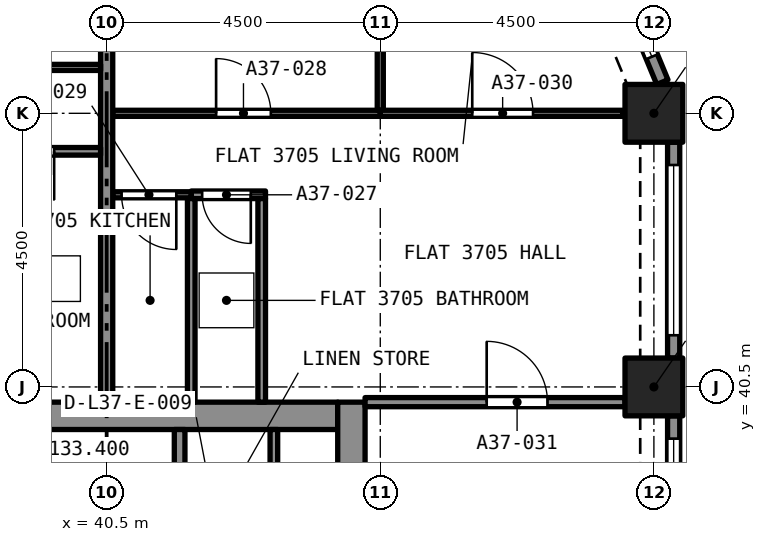
"""IFC4 building model, lengths in metres.
Left out: names, types, materials, properties, quantities, classifications, styles, units other than length and angle.
Written with IfcOpenShell. Run it as: python <this file> out.ifc"""

import sys

from ifc_helpers import new_model, si_unit, direction, frame, frame_2d, origin, origin_2d, place, context, subcontext, project, spatial, rectangle, extrude, element, fill, save


model = new_model("IFC4")
c1 = context("Model", 3, precision=1e-05, world=origin(), true_north=direction((0.0, 1.0)))
c2 = subcontext(c1, "Body", "Model", "MODEL_VIEW")
j1 = project(units=[si_unit("LENGTHUNIT", "METRE"), si_unit("PLANEANGLEUNIT", "RADIAN")], contexts=[c1])
p1 = place(None, origin())
s1 = spatial("IfcSite", under=j1, at=p1, CompositionType="ELEMENT")
p2 = place(p1, origin())
s2 = spatial("IfcBuilding", under=s1, at=p2, CompositionType="ELEMENT")
p3 = place(p2, frame((0.0, 0.0, 133.4)))
s3 = spatial("IfcBuildingStorey", under=s2, at=p3, CompositionType="ELEMENT", Elevation=133.4)
for number, where, z_axis, x_axis in (
    (1, (49.5, 40.5, 0.0), (0.0, 0.0, 1.0), (1.0, 0.0, 0.0)),
    (2, (49.5, 45.0, 0.0), (0.0, 0.0, 1.0), (1.0, 0.0, 0.0)),
):
    element("IfcColumn", number, at=place(p3, frame(where, z_axis=z_axis, x_axis=x_axis)), inside=s3, PredefinedType="COLUMN", context=c2, shape_type="SweptSolid", body=[
        extrude(rectangle(XDim=0.95, YDim=0.95, at=origin_2d()), origin(), (0.0, 0.0, 1.0), 3.2),
    ])
p4 = place(p3, frame((36.7, 40.025, 0.0), z_axis=(0.0, 0.0, 1.0), x_axis=(1.0, 0.0, 0.0)))
e3 = element("IfcWall", 3, at=p4, inside=s3, PredefinedType="SOLIDWALL", context=c2, shape_type="SweptSolid", body=[
    extrude(rectangle(XDim=7.6, YDim=0.45, at=frame_2d((3.8, 0.0))), origin(), (0.0, 0.0, 1.0), 3.2),
])
p5 = place(p3, frame((44.525, 27.25, 0.0), z_axis=(0.0, 0.0, 1.0), x_axis=(0.0, 1.0, 0.0)))
e4 = element("IfcWall", 4, at=p5, inside=s3, PredefinedType="SOLIDWALL", context=c2, shape_type="SweptSolid", body=[
    extrude(rectangle(XDim=13.0, YDim=0.45, at=frame_2d((6.5, 0.0))), origin(), (0.0, 0.0, 1.0), 3.2),
])
p6 = place(p5, frame((8.7, 0.0, 0.0)))
e5 = element("IfcOpeningElement", 5, at=p6, cuts=e4, PredefinedType="OPENING", context=c2, shape_type="SweptSolid", body=[
    extrude(rectangle(XDim=1.2, YDim=2.1, at=frame_2d((0.6, 1.05))), frame((0.0, 0.235, 0.0), z_axis=(0.0, -1.0, 0.0), x_axis=(1.0, 0.0, 0.0)), (0.0, 0.0, 1.0), 0.47),
])
p7 = place(p3, frame((49.825, 40.025, 0.0), z_axis=(0.0, 0.0, 1.0), x_axis=(0.0, -1.0, 0.0)))
e6 = element("IfcWall", 6, at=p7, inside=s3, PredefinedType="SOLIDWALL", context=c2, shape_type="SweptSolid", body=[
    extrude(rectangle(XDim=3.55, YDim=0.2, at=frame_2d((1.775, 0.0))), origin(), (0.0, 0.0, 1.0), 3.2),
])
p8 = place(p7, frame((0.375, 0.0, 0.45)))
e7 = element("IfcOpeningElement", 7, at=p8, cuts=e6, PredefinedType="OPENING", context=c2, shape_type="SweptSolid", body=[
    extrude(rectangle(XDim=2.8, YDim=1.95, at=frame_2d((1.4, 0.975))), frame((0.0, 0.11, 0.0), z_axis=(0.0, -1.0, 0.0), x_axis=(1.0, 0.0, 0.0)), (0.0, 0.0, 1.0), 0.22),
])
p9 = place(p3, frame((49.825, 44.525, 0.0), z_axis=(0.0, 0.0, 1.0), x_axis=(0.0, -1.0, 0.0)))
e8 = element("IfcWall", 8, at=p9, inside=s3, PredefinedType="SOLIDWALL", context=c2, shape_type="SweptSolid", body=[
    extrude(rectangle(XDim=3.55, YDim=0.2, at=frame_2d((1.775, 0.0))), origin(), (0.0, 0.0, 1.0), 3.2),
])
p10 = place(p9, frame((0.375, 0.0, 0.45)))
e9 = element("IfcOpeningElement", 9, at=p10, cuts=e8, PredefinedType="OPENING", context=c2, shape_type="SweptSolid", body=[
    extrude(rectangle(XDim=2.8, YDim=1.95, at=frame_2d((1.4, 0.975))), frame((0.0, 0.11, 0.0), z_axis=(0.0, -1.0, 0.0), x_axis=(1.0, 0.0, 0.0)), (0.0, 0.0, 1.0), 0.22),
])
p11 = place(p3, frame((48.72, 47.733, 0.0), z_axis=(0.0, 0.0, 1.0), x_axis=(0.382680855588, -0.923880599843, 0.0)))
e10 = element("IfcWall", 10, at=p11, inside=s3, PredefinedType="SOLIDWALL", context=c2, shape_type="SweptSolid", body=[
    extrude(rectangle(XDim=2.403, YDim=0.2, at=frame_2d((1.201, 0.0))), origin(), (0.0, 0.0, 1.0), 3.2),
])
p12 = place(p11, frame((0.251, 0.0, 0.45)))
e11 = element("IfcOpeningElement", 11, at=p12, cuts=e10, PredefinedType="OPENING", context=c2, shape_type="SweptSolid", body=[
    extrude(rectangle(XDim=1.7, YDim=1.95, at=frame_2d((0.85, 0.975))), frame((0.0, 0.11, 0.0), z_axis=(0.0, -1.0, 0.0), x_axis=(1.0, 0.0, 0.0)), (0.0, 0.0, 1.0), 0.22),
])
p13 = place(p3, frame((43.113, 43.66, 0.0), z_axis=(0.0, 0.0, 1.0), x_axis=(-1.0, 0.0, 0.0)))
e12 = element("IfcWall", 12, at=p13, inside=s3, PredefinedType="PARTITIONING", context=c2, shape_type="SweptSolid", body=[
    extrude(rectangle(XDim=1.222, YDim=0.125, at=frame_2d((0.611, 0.0))), origin(), (0.0, 0.0, 1.0), 2.9),
])
p14 = place(p13, frame((0.242, 0.0, 0.0)))
e13 = element("IfcOpeningElement", 13, at=p14, cuts=e12, PredefinedType="OPENING", context=c2, shape_type="SweptSolid", body=[
    extrude(rectangle(XDim=0.8, YDim=2.1, at=frame_2d((0.4, 1.05))), frame((0.0, 0.073, 0.0), z_axis=(0.0, -1.0, 0.0), x_axis=(1.0, 0.0, 0.0)), (0.0, 0.0, 1.0), 0.145),
])
for number, where, z_axis, x_axis in (
    (14, (43.05, 40.25, 0.0), (0.0, 0.0, 1.0), (0.0, 1.0, 0.0)),
    (15, (41.891, 40.25, 0.0), (0.0, 0.0, 1.0), (0.0, 1.0, 0.0)),
):
    element("IfcWall", number, at=place(p3, frame(where, z_axis=z_axis, x_axis=x_axis)), inside=s3, PredefinedType="PARTITIONING", context=c2, shape_type="SweptSolid", body=[
        extrude(rectangle(XDim=3.347, YDim=0.125, at=frame_2d((1.674, 0.0))), origin(), (0.0, 0.0, 1.0), 2.9),
    ])
p15 = place(p3, frame((40.6, 45.0, 0.0), z_axis=(0.0, 0.0, 1.0), x_axis=(1.0, 0.0, 0.0)))
e16 = element("IfcWall", 16, at=p15, inside=s3, PredefinedType="PARTITIONING", context=c2, shape_type="SweptSolid", body=[
    extrude(rectangle(XDim=4.4, YDim=0.1, at=frame_2d((2.2, 0.0))), origin(), (0.0, 0.0, 1.0), 2.9),
])
p16 = place(p15, frame((1.7, 0.0, 0.0)))
e17 = element("IfcOpeningElement", 17, at=p16, cuts=e16, PredefinedType="OPENING", context=c2, shape_type="SweptSolid", body=[
    extrude(rectangle(XDim=0.9, YDim=2.1, at=frame_2d((0.45, 1.05))), frame((0.0, 0.06, 0.0), z_axis=(0.0, -1.0, 0.0), x_axis=(1.0, 0.0, 0.0)), (0.0, 0.0, 1.0), 0.12),
])
p17 = place(p3, frame((45.0, 45.05, 0.0), z_axis=(0.0, 0.0, 1.0), x_axis=(0.0, 1.0, 0.0)))
e18 = element("IfcWall", 18, at=p17, inside=s3, PredefinedType="PARTITIONING", context=c2, shape_type="SweptSolid", body=[
    extrude(rectangle(XDim=3.936, YDim=0.1, at=frame_2d((1.968, 0.0))), origin(), (0.0, 0.0, 1.0), 2.9),
])
p18 = place(p3, frame((41.891, 43.66, 0.0), z_axis=(0.0, 0.0, 1.0), x_axis=(-1.0, 0.0, 0.0)))
e19 = element("IfcWall", 19, at=p18, inside=s3, PredefinedType="PARTITIONING", context=c2, shape_type="SweptSolid", body=[
    extrude(rectangle(XDim=1.291, YDim=0.1, at=frame_2d((0.646, 0.0))), origin(), (0.0, 0.0, 1.0), 2.9),
])
p19 = place(p18, frame((0.246, 0.0, 0.0)))
e20 = element("IfcOpeningElement", 20, at=p19, cuts=e19, PredefinedType="OPENING", context=c2, shape_type="SweptSolid", body=[
    extrude(rectangle(XDim=0.9, YDim=2.1, at=frame_2d((0.45, 1.05))), frame((0.0, 0.06, 0.0), z_axis=(0.0, -1.0, 0.0), x_axis=(1.0, 0.0, 0.0)), (0.0, 0.0, 1.0), 0.12),
])
p20 = place(p3, frame((45.0, 45.0, 0.0), z_axis=(0.0, 0.0, 1.0), x_axis=(1.0, 0.0, 0.0)))
e21 = element("IfcWall", 21, at=p20, inside=s3, PredefinedType="PARTITIONING", context=c2, shape_type="SweptSolid", body=[
    extrude(rectangle(XDim=3.986, YDim=0.1, at=frame_2d((1.993, 0.0))), origin(), (0.0, 0.0, 1.0), 2.9),
])
p21 = place(p20, frame((1.512, 0.0, 0.0)))
e22 = element("IfcOpeningElement", 22, at=p21, cuts=e21, PredefinedType="OPENING", context=c2, shape_type="SweptSolid", body=[
    extrude(rectangle(XDim=1.0, YDim=2.1, at=frame_2d((0.5, 1.05))), frame((0.0, 0.06, 0.0), z_axis=(0.0, -1.0, 0.0), x_axis=(1.0, 0.0, 0.0)), (0.0, 0.0, 1.0), 0.12),
])
p22 = place(p3, frame((44.75, 40.25, 0.0), z_axis=(0.0, 0.0, 1.0), x_axis=(1.0, 0.0, 0.0)))
e23 = element("IfcWall", 23, at=p22, inside=s3, PredefinedType="PARTITIONING", context=c2, shape_type="SweptSolid", body=[
    extrude(rectangle(XDim=4.275, YDim=0.15, at=frame_2d((2.137, 0.0))), origin(), (0.0, 0.0, 1.0), 2.9),
])
p23 = place(p22, frame((2.0, 0.0, 0.0)))
e24 = element("IfcOpeningElement", 24, at=p23, cuts=e23, PredefinedType="OPENING", context=c2, shape_type="SweptSolid", body=[
    extrude(rectangle(XDim=1.0, YDim=2.1, at=frame_2d((0.5, 1.05))), frame((0.0, 0.085, 0.0), z_axis=(0.0, -1.0, 0.0), x_axis=(1.0, 0.0, 0.0)), (0.0, 0.0, 1.0), 0.17),
])
p24 = place(p3, frame((40.5, 40.25, 0.0), z_axis=(0.0, 0.0, 1.0), x_axis=(0.0, 1.0, 0.0)))
e25 = element("IfcWall", 25, at=p24, inside=s3, PredefinedType="PARTITIONING", context=c2, shape_type="SweptSolid", body=[
    extrude(rectangle(XDim=8.775, YDim=0.2, at=frame_2d((4.387, 0.0))), origin(), (0.0, 0.0, 1.0), 2.9),
])
p25 = place(p3, frame((40.4, 44.375, 0.0), z_axis=(0.0, 0.0, 1.0), x_axis=(-1.0, 0.0, 0.0)))
e26 = element("IfcWall", 26, at=p25, inside=s3, PredefinedType="PARTITIONING", context=c2, shape_type="SweptSolid", body=[
    extrude(rectangle(XDim=2.427, YDim=0.125, at=frame_2d((1.214, 0.0))), origin(), (0.0, 0.0, 1.0), 2.9),
])
p26 = place(p25, frame((0.764, 0.0, 0.0)))
e27 = element("IfcOpeningElement", 27, at=p26, cuts=e26, PredefinedType="OPENING", context=c2, shape_type="SweptSolid", body=[
    extrude(rectangle(XDim=0.8, YDim=2.1, at=frame_2d((0.4, 1.05))), frame((0.0, 0.073, 0.0), z_axis=(0.0, -1.0, 0.0), x_axis=(1.0, 0.0, 0.0)), (0.0, 0.0, 1.0), 0.145),
])
p27 = place(p3, frame((36.0, 45.755, 0.0), z_axis=(0.0, 0.0, 1.0), x_axis=(1.0, 0.0, 0.0)))
e28 = element("IfcWall", 28, at=p27, inside=s3, PredefinedType="PARTITIONING", context=c2, shape_type="SweptSolid", body=[
    extrude(rectangle(XDim=4.4, YDim=0.1, at=frame_2d((2.2, 0.0))), origin(), (0.0, 0.0, 1.0), 2.9),
])
p28 = place(p27, frame((1.8, 0.0, 0.0)))
e29 = element("IfcOpeningElement", 29, at=p28, cuts=e28, PredefinedType="OPENING", context=c2, shape_type="SweptSolid", body=[
    extrude(rectangle(XDim=0.9, YDim=2.1, at=frame_2d((0.45, 1.05))), frame((0.0, 0.06, 0.0), z_axis=(0.0, -1.0, 0.0), x_axis=(1.0, 0.0, 0.0)), (0.0, 0.0, 1.0), 0.12),
])
p29 = place(p3, frame((41.7, 37.5, 0.0), z_axis=(0.0, 0.0, 1.0), x_axis=(0.0, 1.0, 0.0)))
e30 = element("IfcWall", 30, at=p29, inside=s3, PredefinedType="SOLIDWALL", context=c2, shape_type="SweptSolid", body=[
    extrude(rectangle(XDim=2.3, YDim=0.175, at=frame_2d((1.15, 0.0))), origin(), (0.0, 0.0, 1.0), 2.9),
])
p30 = place(p3, frame((43.25, 37.5, 0.0), z_axis=(0.0, 0.0, 1.0), x_axis=(0.0, 1.0, 0.0)))
e31 = element("IfcWall", 31, at=p30, inside=s3, PredefinedType="PARTITIONING", context=c2, shape_type="SweptSolid", body=[
    extrude(rectangle(XDim=2.3, YDim=0.125, at=frame_2d((1.15, 0.0))), origin(), (0.0, 0.0, 1.0), 2.9),
])
p31 = place(p8, origin())
e32 = element("IfcWindow", 32, at=p31, inside=s3, PartitioningType="SINGLE_PANEL", PredefinedType="WINDOW", context=c2, shape_type="SweptSolid", body=[
    extrude(rectangle(XDim=2.8, YDim=1.95, at=frame_2d((1.4, 0.975))), frame((0.0, 0.03, 0.0), z_axis=(0.0, -1.0, 0.0), x_axis=(1.0, 0.0, 0.0)), (0.0, 0.0, 1.0), 0.06),
])
fill(e7, e32)
p32 = place(p10, origin())
e33 = element("IfcWindow", 33, at=p32, inside=s3, PartitioningType="SINGLE_PANEL", PredefinedType="WINDOW", context=c2, shape_type="SweptSolid", body=[
    extrude(rectangle(XDim=2.8, YDim=1.95, at=frame_2d((1.4, 0.975))), frame((0.0, 0.03, 0.0), z_axis=(0.0, -1.0, 0.0), x_axis=(1.0, 0.0, 0.0)), (0.0, 0.0, 1.0), 0.06),
])
fill(e9, e33)
p33 = place(p12, origin())
e34 = element("IfcWindow", 34, at=p33, inside=s3, PartitioningType="SINGLE_PANEL", PredefinedType="WINDOW", context=c2, shape_type="SweptSolid", body=[
    extrude(rectangle(XDim=1.7, YDim=1.95, at=frame_2d((0.85, 0.975))), frame((0.0, 0.03, 0.0), z_axis=(0.0, -1.0, 0.0), x_axis=(1.0, 0.0, 0.0)), (0.0, 0.0, 1.0), 0.06),
])
fill(e11, e34)
p34 = place(p14, origin())
e35 = element("IfcDoor", 35, at=p34, inside=s3, OperationType="SINGLE_SWING_RIGHT", PredefinedType="DOOR", context=c2, shape_type="SweptSolid", body=[
    extrude(rectangle(XDim=0.8, YDim=2.1, at=frame_2d((0.4, 1.05))), frame((0.0, 0.025, 0.0), z_axis=(0.0, -1.0, 0.0), x_axis=(1.0, 0.0, 0.0)), (0.0, 0.0, 1.0), 0.05),
])
fill(e13, e35)
p35 = place(p16, origin())
e36 = element("IfcDoor", 36, at=p35, inside=s3, OperationType="SINGLE_SWING_LEFT", PredefinedType="DOOR", context=c2, shape_type="SweptSolid", body=[
    extrude(rectangle(XDim=0.9, YDim=2.1, at=frame_2d((0.45, 1.05))), frame((0.0, 0.025, 0.0), z_axis=(0.0, -1.0, 0.0), x_axis=(1.0, 0.0, 0.0)), (0.0, 0.0, 1.0), 0.05),
])
fill(e17, e36)
p36 = place(p19, origin())
e37 = element("IfcDoor", 37, at=p36, inside=s3, OperationType="SINGLE_SWING_RIGHT", PredefinedType="DOOR", context=c2, shape_type="SweptSolid", body=[
    extrude(rectangle(XDim=0.9, YDim=2.1, at=frame_2d((0.45, 1.05))), frame((0.0, 0.025, 0.0), z_axis=(0.0, -1.0, 0.0), x_axis=(1.0, 0.0, 0.0)), (0.0, 0.0, 1.0), 0.05),
])
fill(e20, e37)
p37 = place(p21, origin())
e38 = element("IfcDoor", 38, at=p37, inside=s3, OperationType="SINGLE_SWING_RIGHT", PredefinedType="DOOR", context=c2, shape_type="SweptSolid", body=[
    extrude(rectangle(XDim=1.0, YDim=2.1, at=frame_2d((0.5, 1.05))), frame((0.0, 0.025, 0.0), z_axis=(0.0, -1.0, 0.0), x_axis=(1.0, 0.0, 0.0)), (0.0, 0.0, 1.0), 0.05),
])
fill(e22, e38)
p38 = place(p23, origin())
e39 = element("IfcDoor", 39, at=p38, inside=s3, OperationType="SINGLE_SWING_RIGHT", PredefinedType="DOOR", context=c2, shape_type="SweptSolid", body=[
    extrude(rectangle(XDim=1.0, YDim=2.1, at=frame_2d((0.5, 1.05))), frame((0.0, 0.025, 0.0), z_axis=(0.0, -1.0, 0.0), x_axis=(1.0, 0.0, 0.0)), (0.0, 0.0, 1.0), 0.05),
])
fill(e24, e39)
p39 = place(p26, origin())
e40 = element("IfcDoor", 40, at=p39, inside=s3, OperationType="SINGLE_SWING_LEFT", PredefinedType="DOOR", context=c2, shape_type="SweptSolid", body=[
    extrude(rectangle(XDim=0.8, YDim=2.1, at=frame_2d((0.4, 1.05))), frame((0.0, 0.025, 0.0), z_axis=(0.0, -1.0, 0.0), x_axis=(1.0, 0.0, 0.0)), (0.0, 0.0, 1.0), 0.05),
])
fill(e27, e40)
save(model, sys.argv[1])
